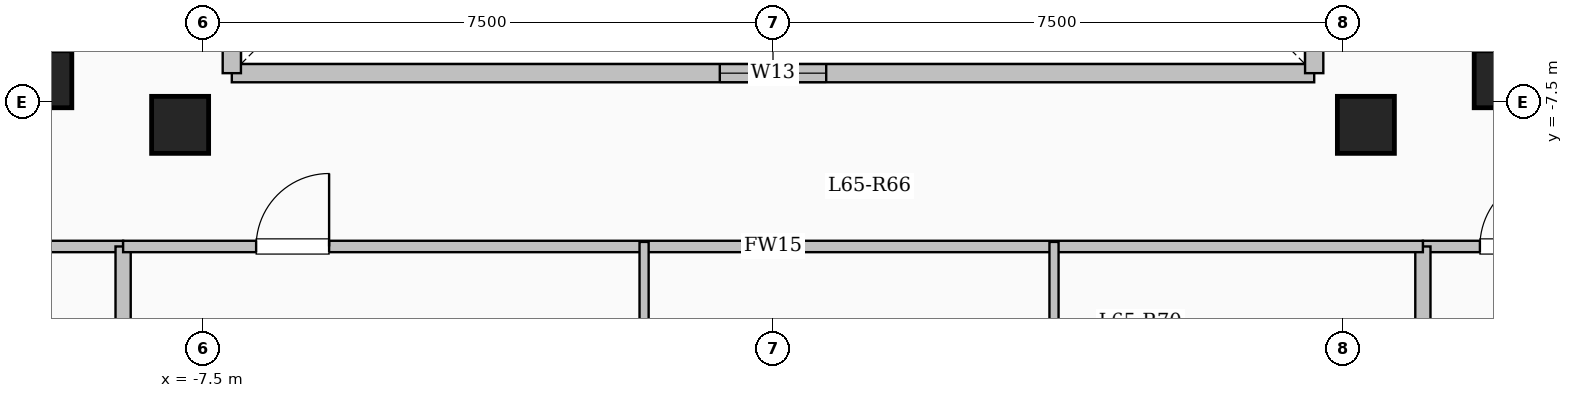
"""IFC4 building model, lengths in metres.
Left out: names, types, materials, properties, quantities, classifications, styles, units other than length and angle.
Written with IfcOpenShell. Run it as: python <this file> out.ifc"""

import sys

from ifc_helpers import new_model, si_unit, direction, frame, frame_2d, origin, origin_2d, place, context, subcontext, project, spatial, rectangle, extrude, element, fill, save


model = new_model("IFC4")
c1 = context("Model", 3, precision=1e-05, world=origin(), true_north=direction((0.0, 1.0)))
c2 = subcontext(c1, "Body", "Model", "MODEL_VIEW")
j1 = project(units=[si_unit("LENGTHUNIT", "METRE"), si_unit("PLANEANGLEUNIT", "RADIAN")], contexts=[c1])
p1 = place(None, origin())
s1 = spatial("IfcSite", under=j1, at=p1, CompositionType="ELEMENT")
p2 = place(p1, origin())
s2 = spatial("IfcBuilding", under=s1, at=p2, CompositionType="ELEMENT")
p3 = place(p2, frame((0.0, 0.0, 241.5)))
s3 = spatial("IfcBuildingStorey", under=s2, at=p3, CompositionType="ELEMENT", Elevation=241.5)
for number, where, z_axis, x_axis in (
    (1, (-7.8, -7.8, 0.0), (0.0, 0.0, 1.0), (1.0, 0.0, 0.0)),
    (2, (7.8, -7.8, 0.0), (0.0, 0.0, 1.0), (1.0, 0.0, 0.0)),
    (3, (-9.6, -7.2, 0.0), (0.0, 0.0, 1.0), (1.0, 0.0, 0.0)),
    (4, (9.6, -7.2, 0.0), (0.0, 0.0, 1.0), (1.0, 0.0, 0.0)),
):
    element("IfcColumn", number, at=place(p3, frame(where, z_axis=z_axis, x_axis=x_axis)), inside=s3, PredefinedType="COLUMN", context=c2, shape_type="SweptSolid", body=[
        extrude(rectangle(XDim=0.75, YDim=0.75, at=origin_2d()), origin(), (0.0, 0.0, 1.0), 3.35),
    ])
p4 = place(p3, frame((-7.12, -7.12, 0.0), z_axis=(0.0, 0.0, 1.0), x_axis=(1.0, 0.0, 0.0)))
e5 = element("IfcWall", 5, at=p4, inside=s3, PredefinedType="SOLIDWALL", context=c2, shape_type="SweptSolid", body=[
    extrude(rectangle(XDim=14.24, YDim=0.24, at=frame_2d((7.12, 0.0))), origin(), (0.0, 0.0, 1.0), 3.1),
])
p5 = place(p4, frame((6.42, 0.0, 0.95)))
e6 = element("IfcOpeningElement", 6, at=p5, cuts=e5, PredefinedType="OPENING", context=c2, shape_type="SweptSolid", body=[
    extrude(rectangle(XDim=1.4, YDim=1.5, at=frame_2d((0.7, 0.75))), frame((0.0, 0.13, 0.0), z_axis=(0.0, -1.0, 0.0), x_axis=(1.0, 0.0, 0.0)), (0.0, 0.0, 1.0), 0.26),
])
p6 = place(p3, frame((7.12, -7.12, 0.0), z_axis=(0.0, 0.0, 1.0), x_axis=(0.0, 1.0, 0.0)))
e7 = element("IfcWall", 7, at=p6, inside=s3, PredefinedType="SOLIDWALL", context=c2, shape_type="SweptSolid", body=[
    extrude(rectangle(XDim=14.24, YDim=0.24, at=frame_2d((7.12, 0.0))), origin(), (0.0, 0.0, 1.0), 3.1),
])
p7 = place(p6, frame((6.42, 0.0, 0.95)))
e8 = element("IfcOpeningElement", 8, at=p7, cuts=e7, PredefinedType="OPENING", context=c2, shape_type="SweptSolid", body=[
    extrude(rectangle(XDim=1.4, YDim=1.5, at=frame_2d((0.7, 0.75))), frame((0.0, 0.13, 0.0), z_axis=(0.0, -1.0, 0.0), x_axis=(1.0, 0.0, 0.0)), (0.0, 0.0, 1.0), 0.26),
])
p8 = place(p3, frame((-7.12, 7.12, 0.0), z_axis=(0.0, 0.0, 1.0), x_axis=(0.0, -1.0, 0.0)))
e9 = element("IfcWall", 9, at=p8, inside=s3, PredefinedType="SOLIDWALL", context=c2, shape_type="SweptSolid", body=[
    extrude(rectangle(XDim=14.24, YDim=0.24, at=frame_2d((7.12, 0.0))), origin(), (0.0, 0.0, 1.0), 3.1),
])
p9 = place(p8, frame((6.42, 0.0, 0.95)))
e10 = element("IfcOpeningElement", 10, at=p9, cuts=e9, PredefinedType="OPENING", context=c2, shape_type="SweptSolid", body=[
    extrude(rectangle(XDim=1.4, YDim=1.5, at=frame_2d((0.7, 0.75))), frame((0.0, 0.13, 0.0), z_axis=(0.0, -1.0, 0.0), x_axis=(1.0, 0.0, 0.0)), (0.0, 0.0, 1.0), 0.26),
])
p10 = place(p3, frame((-17.75, -9.4, 0.0), z_axis=(0.0, 0.0, 1.0), x_axis=(1.0, 0.0, 0.0)))
e11 = element("IfcWall", 11, at=p10, inside=s3, PredefinedType="PARTITIONING", context=c2, shape_type="SweptSolid", body=[
    extrude(rectangle(XDim=9.2, YDim=0.15, at=frame_2d((4.6, 0.0))), origin(), (0.0, 0.0, 1.0), 3.1),
])
p11 = place(p10, frame((0.7, 0.0, 0.0)))
e12 = element("IfcOpeningElement", 12, at=p11, cuts=e11, PredefinedType="OPENING", context=c2, shape_type="SweptSolid", body=[
    extrude(rectangle(XDim=0.96, YDim=2.15, at=frame_2d((0.48, 1.075))), frame((0.0, 0.085, 0.0), z_axis=(0.0, -1.0, 0.0), x_axis=(1.0, 0.0, 0.0)), (0.0, 0.0, 1.0), 0.17),
])
p12 = place(p3, frame((8.55, -9.4, 0.0), z_axis=(0.0, 0.0, 1.0), x_axis=(1.0, 0.0, 0.0)))
e13 = element("IfcWall", 13, at=p12, inside=s3, PredefinedType="PARTITIONING", context=c2, shape_type="SweptSolid", body=[
    extrude(rectangle(XDim=9.2, YDim=0.15, at=frame_2d((4.6, 0.0))), origin(), (0.0, 0.0, 1.0), 3.1),
])
p13 = place(p12, frame((0.75, 0.0, 0.0)))
e14 = element("IfcOpeningElement", 14, at=p13, cuts=e13, PredefinedType="OPENING", context=c2, shape_type="SweptSolid", body=[
    extrude(rectangle(XDim=0.96, YDim=2.15, at=frame_2d((0.48, 1.075))), frame((0.0, 0.085, 0.0), z_axis=(0.0, -1.0, 0.0), x_axis=(1.0, 0.0, 0.0)), (0.0, 0.0, 1.0), 0.17),
])
for number, where, z_axis, x_axis in (
    (15, (-8.55, -21.504, 0.0), (0.0, 0.0, 1.0), (0.0, 1.0, 0.0)),
    (16, (8.55, -21.504, 0.0), (0.0, 0.0, 1.0), (0.0, 1.0, 0.0)),
):
    element("IfcWall", number, at=place(p3, frame(where, z_axis=z_axis, x_axis=x_axis)), inside=s3, PredefinedType="SOLIDWALL", context=c2, shape_type="SweptSolid", body=[
        extrude(rectangle(XDim=12.104, YDim=0.2, at=frame_2d((6.052, 0.0))), origin(), (0.0, 0.0, 1.0), 3.1),
    ])
p14 = place(p3, frame((-8.55, -9.4, 0.0), z_axis=(0.0, 0.0, 1.0), x_axis=(1.0, 0.0, 0.0)))
e17 = element("IfcWall", 17, at=p14, inside=s3, PredefinedType="PARTITIONING", context=c2, shape_type="SweptSolid", body=[
    extrude(rectangle(XDim=17.1, YDim=0.15, at=frame_2d((8.55, 0.0))), origin(), (0.0, 0.0, 1.0), 3.1),
])
p15 = place(p14, frame((1.75, 0.0, 0.0)))
e18 = element("IfcOpeningElement", 18, at=p15, cuts=e17, PredefinedType="OPENING", context=c2, shape_type="SweptSolid", body=[
    extrude(rectangle(XDim=0.96, YDim=2.15, at=frame_2d((0.48, 1.075))), frame((0.0, 0.085, 0.0), z_axis=(0.0, -1.0, 0.0), x_axis=(1.0, 0.0, 0.0)), (0.0, 0.0, 1.0), 0.17),
])
p16 = place(p3, frame((-1.696, -22.38, 0.0), z_axis=(0.0, 0.0, 1.0), x_axis=(0.0, 1.0, 0.0)))
e19 = element("IfcWall", 19, at=p16, inside=s3, PredefinedType="PARTITIONING", context=c2, shape_type="SweptSolid", body=[
    extrude(rectangle(XDim=13.04, YDim=0.12, at=frame_2d((6.52, 0.0))), origin(), (0.0, 0.0, 1.0), 3.1),
])
p17 = place(p16, frame((8.705, 0.0, 0.0)))
e20 = element("IfcOpeningElement", 20, at=p17, cuts=e19, PredefinedType="OPENING", context=c2, shape_type="SweptSolid", body=[
    extrude(rectangle(XDim=1.08, YDim=2.15, at=frame_2d((0.54, 1.075))), frame((0.0, 0.07, 0.0), z_axis=(0.0, -1.0, 0.0), x_axis=(1.0, 0.0, 0.0)), (0.0, 0.0, 1.0), 0.14),
])
p18 = place(p3, frame((3.697, -12.31, 0.0), z_axis=(0.0, 0.0, 1.0), x_axis=(0.0, 1.0, 0.0)))
e21 = element("IfcWall", 21, at=p18, inside=s3, PredefinedType="PARTITIONING", context=c2, shape_type="SweptSolid", body=[
    extrude(rectangle(XDim=2.97, YDim=0.12, at=frame_2d((1.485, 0.0))), origin(), (0.0, 0.0, 1.0), 3.1),
])
p19 = place(p5, origin())
e22 = element("IfcWindow", 22, at=p19, inside=s3, PartitioningType="SINGLE_PANEL", PredefinedType="WINDOW", context=c2, shape_type="SweptSolid", body=[
    extrude(rectangle(XDim=1.4, YDim=1.5, at=frame_2d((0.7, 0.75))), frame((0.0, 0.03, 0.0), z_axis=(0.0, -1.0, 0.0), x_axis=(1.0, 0.0, 0.0)), (0.0, 0.0, 1.0), 0.06),
])
fill(e6, e22)
p20 = place(p13, origin())
e23 = element("IfcDoor", 23, at=p20, inside=s3, OperationType="SINGLE_SWING_RIGHT", PredefinedType="DOOR", context=c2, shape_type="SweptSolid", body=[
    extrude(rectangle(XDim=0.96, YDim=2.15, at=frame_2d((0.48, 1.075))), frame((0.0, 0.025, 0.0), z_axis=(0.0, -1.0, 0.0), x_axis=(1.0, 0.0, 0.0)), (0.0, 0.0, 1.0), 0.05),
])
fill(e14, e23)
p21 = place(p15, origin())
e24 = element("IfcDoor", 24, at=p21, inside=s3, OperationType="SINGLE_SWING_RIGHT", PredefinedType="DOOR", context=c2, shape_type="SweptSolid", body=[
    extrude(rectangle(XDim=0.96, YDim=2.15, at=frame_2d((0.48, 1.075))), frame((0.0, 0.025, 0.0), z_axis=(0.0, -1.0, 0.0), x_axis=(1.0, 0.0, 0.0)), (0.0, 0.0, 1.0), 0.05),
])
fill(e18, e24)
save(model, sys.argv[1])
